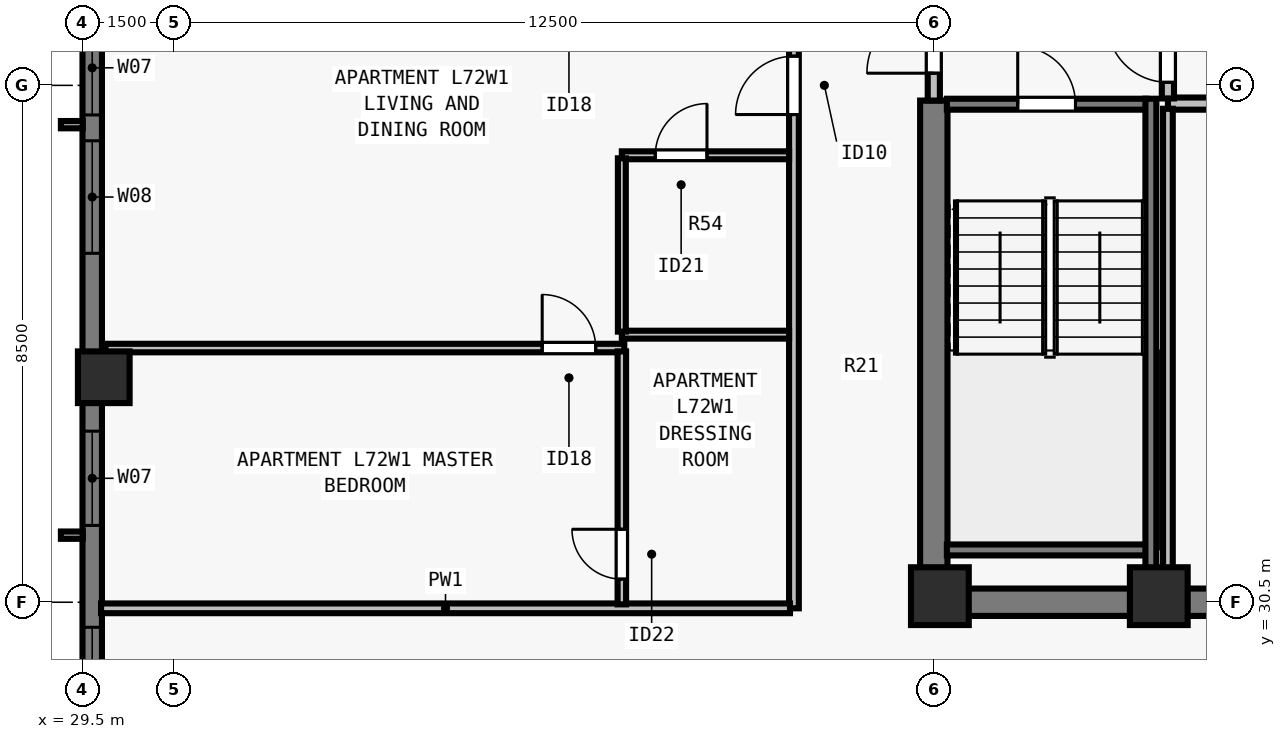
"""IFC4 building model, lengths in metres.
Left out: names, types, materials, properties, quantities, classifications, styles, units other than length and angle.
Written with IfcOpenShell. Run it as: python <this file> out.ifc"""

import sys

from ifc_helpers import new_model, si_unit, direction, frame, frame_2d, origin, origin_2d, place, context, subcontext, project, spatial, rectangle, extrude, element, fill, save


model = new_model("IFC4")
c1 = context("Model", 3, precision=1e-05, world=origin(), true_north=direction((0.0, 1.0)))
c2 = subcontext(c1, "Body", "Model", "MODEL_VIEW")
j1 = project(units=[si_unit("LENGTHUNIT", "METRE"), si_unit("PLANEANGLEUNIT", "RADIAN")], contexts=[c1])
p1 = place(None, origin())
s1 = spatial("IfcSite", under=j1, at=p1, CompositionType="ELEMENT")
p2 = place(p1, origin())
s2 = spatial("IfcBuilding", under=s1, at=p2, CompositionType="ELEMENT")
p3 = place(p2, frame((0.0, 0.0, 262.0)))
s3 = spatial("IfcBuildingStorey", under=s2, at=p3, CompositionType="ELEMENT", Elevation=262.0)
for number, where, z_axis, x_axis in (
    (1, (43.6, 30.6, 0.0), (0.0, 0.0, 1.0), (1.0, 0.0, 0.0)),
    (2, (47.2, 30.6, 0.0), (0.0, 0.0, 1.0), (1.0, 0.0, 0.0)),
):
    element("IfcColumn", number, at=place(p3, frame(where, z_axis=z_axis, x_axis=x_axis)), inside=s3, PredefinedType="COLUMN", context=c2, shape_type="SweptSolid", body=[
        extrude(rectangle(XDim=0.95, YDim=0.95, at=origin_2d()), origin(), (0.0, 0.0, 1.0), 3.5),
    ])
p4 = place(p3, frame((29.85, 34.2, 0.0), z_axis=(0.0, 0.0, 1.0), x_axis=(0.0, 1.0, 0.0)))
e3 = element("IfcColumn", 3, at=p4, inside=s3, PredefinedType="COLUMN", context=c2, shape_type="SweptSolid", body=[
    extrude(rectangle(XDim=0.85, YDim=0.85, at=origin_2d()), origin(), (0.0, 0.0, 1.0), 3.5),
])
p5 = place(p3, frame((29.66, 21.5, 0.0), z_axis=(0.0, 0.0, 1.0), x_axis=(0.0, 1.0, 0.0)))
e4 = element("IfcWall", 4, at=p5, inside=s3, PredefinedType="SOLIDWALL", context=c2, shape_type="SweptSolid", body=[
    extrude(rectangle(XDim=34.702, YDim=0.32, at=frame_2d((17.351, 0.0))), origin(), (0.0, 0.0, 1.0), 3.29),
])
p6 = place(p5, frame((4.312, 0.0, 0.8)))
e5 = element("IfcOpeningElement", 5, at=p6, cuts=e4, PredefinedType="OPENING", context=c2, shape_type="SweptSolid", body=[
    extrude(rectangle(XDim=1.55, YDim=1.678, at=frame_2d((0.775, 0.839))), frame((0.0, 0.17, 0.0), z_axis=(0.0, -1.0, 0.0), x_axis=(1.0, 0.0, 0.0)), (0.0, 0.0, 1.0), 0.34),
])
p7 = place(p5, frame((6.738, 0.0, 0.8)))
e6 = element("IfcOpeningElement", 6, at=p7, cuts=e4, PredefinedType="OPENING", context=c2, shape_type="SweptSolid", body=[
    extrude(rectangle(XDim=1.85, YDim=1.678, at=frame_2d((0.925, 0.839))), frame((0.0, 0.17, 0.0), z_axis=(0.0, -1.0, 0.0), x_axis=(1.0, 0.0, 0.0)), (0.0, 0.0, 1.0), 0.34),
])
p8 = place(p5, frame((10.263, 0.0, 0.8)))
e7 = element("IfcOpeningElement", 7, at=p8, cuts=e4, PredefinedType="OPENING", context=c2, shape_type="SweptSolid", body=[
    extrude(rectangle(XDim=1.55, YDim=1.678, at=frame_2d((0.775, 0.839))), frame((0.0, 0.17, 0.0), z_axis=(0.0, -1.0, 0.0), x_axis=(1.0, 0.0, 0.0)), (0.0, 0.0, 1.0), 0.34),
])
p9 = place(p5, frame((14.738, 0.0, 0.8)))
e8 = element("IfcOpeningElement", 8, at=p9, cuts=e4, PredefinedType="OPENING", context=c2, shape_type="SweptSolid", body=[
    extrude(rectangle(XDim=1.85, YDim=1.678, at=frame_2d((0.925, 0.839))), frame((0.0, 0.17, 0.0), z_axis=(0.0, -1.0, 0.0), x_axis=(1.0, 0.0, 0.0)), (0.0, 0.0, 1.0), 0.34),
])
p10 = place(p5, frame((17.014, 0.0, 0.8)))
e9 = element("IfcOpeningElement", 9, at=p10, cuts=e4, PredefinedType="OPENING", context=c2, shape_type="SweptSolid", body=[
    extrude(rectangle(XDim=1.55, YDim=1.678, at=frame_2d((0.775, 0.839))), frame((0.0, 0.17, 0.0), z_axis=(0.0, -1.0, 0.0), x_axis=(1.0, 0.0, 0.0)), (0.0, 0.0, 1.0), 0.34),
])
p11 = place(p5, frame((24.164, 0.0, 0.8)))
e10 = element("IfcOpeningElement", 10, at=p11, cuts=e4, PredefinedType="OPENING", context=c2, shape_type="SweptSolid", body=[
    extrude(rectangle(XDim=1.55, YDim=1.678, at=frame_2d((0.775, 0.839))), frame((0.0, 0.17, 0.0), z_axis=(0.0, -1.0, 0.0), x_axis=(1.0, 0.0, 0.0)), (0.0, 0.0, 1.0), 0.34),
])
p12 = place(p3, frame((43.275, 30.5, 0.0), z_axis=(0.0, 0.0, 1.0), x_axis=(1.0, 0.0, 0.0)))
e11 = element("IfcWall", 11, at=p12, inside=s3, PredefinedType="SHEAR", context=c2, shape_type="SweptSolid", body=[
    extrude(rectangle(XDim=17.45, YDim=0.45, at=frame_2d((8.725, 0.0))), origin(), (0.0, 0.0, 1.0), 3.29),
])
p13 = place(p3, frame((43.5, 30.715, 0.0), z_axis=(0.0, 0.0, 1.0), x_axis=(0.0, 1.0, 0.0)))
e12 = element("IfcWall", 12, at=p13, inside=s3, PredefinedType="SHEAR", context=c2, shape_type="SweptSolid", body=[
    extrude(rectangle(XDim=8.035, YDim=0.45, at=frame_2d((4.018, 0.0))), origin(), (0.0, 0.0, 1.0), 3.29),
])
p14 = place(p3, frame((47.35, 38.7, 0.0), z_axis=(0.0, 0.0, 1.0), x_axis=(1.0, 0.0, 0.0)))
e13 = element("IfcWall", 13, at=p14, inside=s3, PredefinedType="SOLIDWALL", context=c2, shape_type="SweptSolid", body=[
    extrude(rectangle(XDim=2.95, YDim=0.2, at=frame_2d((1.475, 0.0))), origin(), (0.0, 0.0, 1.0), 3.29),
])
p15 = place(p3, frame((43.5, 38.75, 0.0), z_axis=(0.0, 0.0, 1.0), x_axis=(0.0, 1.0, 0.0)))
e14 = element("IfcWall", 14, at=p15, inside=s3, PredefinedType="SOLIDWALL", context=c2, shape_type="SweptSolid", body=[
    extrude(rectangle(XDim=2.05, YDim=0.2, at=frame_2d((1.025, 0.0))), origin(), (0.0, 0.0, 1.0), 3.29),
])
p16 = place(p15, frame((0.45, 0.0, 0.0)))
e15 = element("IfcOpeningElement", 15, at=p16, cuts=e14, PredefinedType="OPENING", context=c2, shape_type="SweptSolid", body=[
    extrude(rectangle(XDim=1.1, YDim=2.15, at=frame_2d((0.55, 1.075))), frame((0.0, 0.11, 0.0), z_axis=(0.0, -1.0, 0.0), x_axis=(1.0, 0.0, 0.0)), (0.0, 0.0, 1.0), 0.22),
])
p17 = place(p3, frame((47.35, 38.785, 0.0), z_axis=(0.0, 0.0, 1.0), x_axis=(0.0, 1.0, 0.0)))
e16 = element("IfcWall", 16, at=p17, inside=s3, PredefinedType="SOLIDWALL", context=c2, shape_type="SweptSolid", body=[
    extrude(rectangle(XDim=4.865, YDim=0.2, at=frame_2d((2.433, 0.0))), origin(), (0.0, 0.0, 1.0), 3.29),
])
p18 = place(p17, frame((0.265, 0.0, 0.0)))
e17 = element("IfcOpeningElement", 17, at=p18, cuts=e16, PredefinedType="OPENING", context=c2, shape_type="SweptSolid", body=[
    extrude(rectangle(XDim=1.0, YDim=2.15, at=frame_2d((0.5, 1.075))), frame((0.0, 0.11, 0.0), z_axis=(0.0, -1.0, 0.0), x_axis=(1.0, 0.0, 0.0)), (0.0, 0.0, 1.0), 0.22),
])
p19 = place(p3, frame((47.35, 30.71, 0.0), z_axis=(0.0, 0.0, 1.0), x_axis=(0.0, 1.0, 0.0)))
e18 = element("IfcWall", 18, at=p19, inside=s3, PredefinedType="PARTITIONING", context=c2, shape_type="SweptSolid", body=[
    extrude(rectangle(XDim=7.905, YDim=0.16, at=frame_2d((3.953, 0.0))), origin(), (0.0, 0.0, 1.0), 3.29),
])
p20 = place(p3, frame((41.2, 30.4, 0.0), z_axis=(0.0, 0.0, 1.0), x_axis=(0.0, 1.0, 0.0)))
e19 = element("IfcWall", 19, at=p20, inside=s3, PredefinedType="PARTITIONING", context=c2, shape_type="SweptSolid", body=[
    extrude(rectangle(XDim=17.2, YDim=0.16, at=frame_2d((8.6, 0.0))), origin(), (0.0, 0.0, 1.0), 3.29),
])
p21 = place(p20, frame((8.12, 0.0, 0.0)))
e20 = element("IfcOpeningElement", 20, at=p21, cuts=e19, PredefinedType="OPENING", context=c2, shape_type="SweptSolid", body=[
    extrude(rectangle(XDim=0.96, YDim=2.18, at=frame_2d((0.48, 1.09))), frame((0.0, 0.09, 0.0), z_axis=(0.0, -1.0, 0.0), x_axis=(1.0, 0.0, 0.0)), (0.0, 0.0, 1.0), 0.18),
])
p22 = place(p3, frame((29.805, 30.4, 0.0), z_axis=(0.0, 0.0, 1.0), x_axis=(1.0, 0.0, 0.0)))
e21 = element("IfcWall", 21, at=p22, inside=s3, PredefinedType="PARTITIONING", context=c2, shape_type="SweptSolid", body=[
    extrude(rectangle(XDim=11.33, YDim=0.16, at=frame_2d((5.665, 0.0))), origin(), (0.0, 0.0, 1.0), 3.29),
])
p23 = place(p3, frame((38.37, 34.9, 0.0), z_axis=(0.0, 0.0, 1.0), x_axis=(1.0, 0.0, 0.0)))
e22 = element("IfcWall", 22, at=p23, inside=s3, PredefinedType="PLUMBINGWALL", context=c2, shape_type="SweptSolid", body=[
    extrude(rectangle(XDim=2.75, YDim=0.13, at=frame_2d((1.375, 0.0))), origin(), (0.0, 0.0, 1.0), 3.29),
])
p24 = place(p3, frame((38.37, 37.85, 0.0), z_axis=(0.0, 0.0, 1.0), x_axis=(1.0, 0.0, 0.0)))
e23 = element("IfcWall", 23, at=p24, inside=s3, PredefinedType="PLUMBINGWALL", context=c2, shape_type="SweptSolid", body=[
    extrude(rectangle(XDim=2.75, YDim=0.13, at=frame_2d((1.375, 0.0))), origin(), (0.0, 0.0, 1.0), 3.29),
])
p25 = place(p24, frame((0.55, 0.0, 0.0)))
e24 = element("IfcOpeningElement", 24, at=p25, cuts=e23, PredefinedType="OPENING", context=c2, shape_type="SweptSolid", body=[
    extrude(rectangle(XDim=0.85, YDim=2.08, at=frame_2d((0.425, 1.04))), frame((0.0, 0.075, 0.0), z_axis=(0.0, -1.0, 0.0), x_axis=(1.0, 0.0, 0.0)), (0.0, 0.0, 1.0), 0.15),
])
p26 = place(p3, frame((38.37, 34.95, 0.0), z_axis=(0.0, 0.0, 1.0), x_axis=(0.0, 1.0, 0.0)))
e25 = element("IfcWall", 25, at=p26, inside=s3, PredefinedType="PLUMBINGWALL", context=c2, shape_type="SweptSolid", body=[
    extrude(rectangle(XDim=2.85, YDim=0.13, at=frame_2d((1.425, 0.0))), origin(), (0.0, 0.0, 1.0), 3.29),
])
p27 = place(p3, frame((29.88, 34.68, 0.0), z_axis=(0.0, 0.0, 1.0), x_axis=(1.0, 0.0, 0.0)))
e26 = element("IfcWall", 26, at=p27, inside=s3, PredefinedType="PARTITIONING", context=c2, shape_type="SweptSolid", body=[
    extrude(rectangle(XDim=8.53, YDim=0.14, at=frame_2d((4.265, 0.0))), origin(), (0.0, 0.0, 1.0), 2.958),
])
p28 = place(p27, frame((7.18, 0.0, 0.0)))
e27 = element("IfcOpeningElement", 27, at=p28, cuts=e26, PredefinedType="OPENING", context=c2, shape_type="SweptSolid", body=[
    extrude(rectangle(XDim=0.88, YDim=2.1, at=frame_2d((0.44, 1.05))), frame((0.0, 0.08, 0.0), z_axis=(0.0, -1.0, 0.0), x_axis=(1.0, 0.0, 0.0)), (0.0, 0.0, 1.0), 0.16),
])
p29 = place(p3, frame((38.37, 30.465, 0.0), z_axis=(0.0, 0.0, 1.0), x_axis=(0.0, 1.0, 0.0)))
e28 = element("IfcWall", 28, at=p29, inside=s3, PredefinedType="PARTITIONING", context=c2, shape_type="SweptSolid", body=[
    extrude(rectangle(XDim=4.16, YDim=0.14, at=frame_2d((2.08, 0.0))), origin(), (0.0, 0.0, 1.0), 3.29),
])
p30 = place(p29, frame((0.415, 0.0, 0.0)))
e29 = element("IfcOpeningElement", 29, at=p30, cuts=e28, PredefinedType="OPENING", context=c2, shape_type="SweptSolid", body=[
    extrude(rectangle(XDim=0.82, YDim=2.1, at=frame_2d((0.41, 1.05))), frame((0.0, 0.08, 0.0), z_axis=(0.0, -1.0, 0.0), x_axis=(1.0, 0.0, 0.0)), (0.0, 0.0, 1.0), 0.16),
])
p31 = place(p3, frame((43.715, 38.69, 0.0), z_axis=(0.0, 0.0, 1.0), x_axis=(1.0, 0.0, 0.0)))
e30 = element("IfcWall", 30, at=p31, inside=s3, PredefinedType="SOLIDWALL", context=c2, shape_type="SweptSolid", body=[
    extrude(rectangle(XDim=3.28, YDim=0.18, at=frame_2d((1.64, 0.0))), origin(), (0.0, 0.0, 1.0), 3.29),
])
p32 = place(p31, frame((1.165, 0.0, 0.0)))
e31 = element("IfcOpeningElement", 31, at=p32, cuts=e30, PredefinedType="OPENING", context=c2, shape_type="SweptSolid", body=[
    extrude(rectangle(XDim=0.95, YDim=2.15, at=frame_2d((0.475, 1.075))), frame((0.0, 0.1, 0.0), z_axis=(0.0, -1.0, 0.0), x_axis=(1.0, 0.0, 0.0)), (0.0, 0.0, 1.0), 0.2),
])
p33 = place(p3, frame((43.715, 31.36, 0.0), z_axis=(0.0, 0.0, 1.0), x_axis=(1.0, 0.0, 0.0)))
e32 = element("IfcWall", 32, at=p33, inside=s3, PredefinedType="SOLIDWALL", context=c2, shape_type="SweptSolid", body=[
    extrude(rectangle(XDim=3.28, YDim=0.18, at=frame_2d((1.64, 0.0))), origin(), (0.0, 0.0, 1.0), 3.29),
])
p34 = place(p3, frame((47.07, 38.78, 0.0), z_axis=(0.0, 0.0, 1.0), x_axis=(0.0, -1.0, 0.0)))
e33 = element("IfcWall", 33, at=p34, inside=s3, PredefinedType="SOLIDWALL", context=c2, shape_type="SweptSolid", body=[
    extrude(rectangle(XDim=8.067, YDim=0.18, at=frame_2d((4.034, 0.0))), origin(), (0.0, 0.0, 1.0), 3.29),
])
p35 = place(p7, origin())
e34 = element("IfcWindow", 34, at=p35, inside=s3, PartitioningType="SINGLE_PANEL", PredefinedType="WINDOW", context=c2, shape_type="SweptSolid", body=[
    extrude(rectangle(XDim=1.85, YDim=1.678, at=frame_2d((0.925, 0.839))), frame((0.0, -0.05, 0.0), z_axis=(0.0, -1.0, 0.0), x_axis=(1.0, 0.0, 0.0)), (0.0, 0.0, 1.0), 0.06),
])
fill(e6, e34)
p36 = place(p8, origin())
e35 = element("IfcWindow", 35, at=p36, inside=s3, PartitioningType="SINGLE_PANEL", PredefinedType="WINDOW", context=c2, shape_type="SweptSolid", body=[
    extrude(rectangle(XDim=1.55, YDim=1.678, at=frame_2d((0.775, 0.839))), frame((0.0, -0.05, 0.0), z_axis=(0.0, -1.0, 0.0), x_axis=(1.0, 0.0, 0.0)), (0.0, 0.0, 1.0), 0.06),
])
fill(e7, e35)
p37 = place(p9, origin())
e36 = element("IfcWindow", 36, at=p37, inside=s3, PartitioningType="SINGLE_PANEL", PredefinedType="WINDOW", context=c2, shape_type="SweptSolid", body=[
    extrude(rectangle(XDim=1.85, YDim=1.678, at=frame_2d((0.925, 0.839))), frame((0.0, -0.05, 0.0), z_axis=(0.0, -1.0, 0.0), x_axis=(1.0, 0.0, 0.0)), (0.0, 0.0, 1.0), 0.06),
])
fill(e8, e36)
p38 = place(p10, origin())
e37 = element("IfcWindow", 37, at=p38, inside=s3, PartitioningType="SINGLE_PANEL", PredefinedType="WINDOW", context=c2, shape_type="SweptSolid", body=[
    extrude(rectangle(XDim=1.55, YDim=1.678, at=frame_2d((0.775, 0.839))), frame((0.0, -0.05, 0.0), z_axis=(0.0, -1.0, 0.0), x_axis=(1.0, 0.0, 0.0)), (0.0, 0.0, 1.0), 0.06),
])
fill(e9, e37)
p39 = place(p16, origin())
e38 = element("IfcDoor", 38, at=p39, inside=s3, OperationType="SINGLE_SWING_LEFT", PredefinedType="DOOR", context=c2, shape_type="SweptSolid", body=[
    extrude(rectangle(XDim=1.1, YDim=2.15, at=frame_2d((0.55, 1.075))), frame((0.0, 0.025, 0.0), z_axis=(0.0, -1.0, 0.0), x_axis=(1.0, 0.0, 0.0)), (0.0, 0.0, 1.0), 0.05),
])
fill(e15, e38)
p40 = place(p18, origin())
e39 = element("IfcDoor", 39, at=p40, inside=s3, OperationType="SINGLE_SWING_RIGHT", PredefinedType="DOOR", context=c2, shape_type="SweptSolid", body=[
    extrude(rectangle(XDim=1.0, YDim=2.15, at=frame_2d((0.5, 1.075))), frame((0.0, 0.025, 0.0), z_axis=(0.0, -1.0, 0.0), x_axis=(1.0, 0.0, 0.0)), (0.0, 0.0, 1.0), 0.05),
])
fill(e17, e39)
p41 = place(p25, origin())
e40 = element("IfcDoor", 40, at=p41, inside=s3, OperationType="SINGLE_SWING_RIGHT", PredefinedType="DOOR", context=c2, shape_type="SweptSolid", body=[
    extrude(rectangle(XDim=0.85, YDim=2.08, at=frame_2d((0.425, 1.04))), frame((0.0, 0.025, 0.0), z_axis=(0.0, -1.0, 0.0), x_axis=(1.0, 0.0, 0.0)), (0.0, 0.0, 1.0), 0.05),
])
fill(e24, e40)
p42 = place(p30, origin())
e41 = element("IfcDoor", 41, at=p42, inside=s3, OperationType="SINGLE_SWING_RIGHT", PredefinedType="DOOR", context=c2, shape_type="SweptSolid", body=[
    extrude(rectangle(XDim=0.82, YDim=2.1, at=frame_2d((0.41, 1.05))), frame((0.0, 0.025, 0.0), z_axis=(0.0, -1.0, 0.0), x_axis=(1.0, 0.0, 0.0)), (0.0, 0.0, 1.0), 0.05),
])
fill(e29, e41)
p43 = place(p28, origin())
e42 = element("IfcDoor", 42, at=p43, inside=s3, OperationType="SINGLE_SWING_LEFT", PredefinedType="DOOR", context=c2, shape_type="SweptSolid", body=[
    extrude(rectangle(XDim=0.88, YDim=2.1, at=frame_2d((0.44, 1.05))), frame((0.0, 0.025, 0.0), z_axis=(0.0, -1.0, 0.0), x_axis=(1.0, 0.0, 0.0)), (0.0, 0.0, 1.0), 0.05),
])
fill(e27, e42)
p44 = place(p21, origin())
e43 = element("IfcDoor", 43, at=p44, inside=s3, OperationType="SINGLE_SWING_LEFT", PredefinedType="DOOR", context=c2, shape_type="SweptSolid", body=[
    extrude(rectangle(XDim=0.96, YDim=2.18, at=frame_2d((0.48, 1.09))), frame((0.0, 0.025, 0.0), z_axis=(0.0, -1.0, 0.0), x_axis=(1.0, 0.0, 0.0)), (0.0, 0.0, 1.0), 0.05),
])
fill(e20, e43)
p45 = place(p32, origin())
e44 = element("IfcDoor", 44, at=p45, inside=s3, OperationType="SINGLE_SWING_LEFT", PredefinedType="DOOR", context=c2, shape_type="SweptSolid", body=[
    extrude(rectangle(XDim=0.95, YDim=2.15, at=frame_2d((0.475, 1.075))), frame((0.0, 0.025, 0.0), z_axis=(0.0, -1.0, 0.0), x_axis=(1.0, 0.0, 0.0)), (0.0, 0.0, 1.0), 0.05),
])
fill(e31, e44)
save(model, sys.argv[1])
